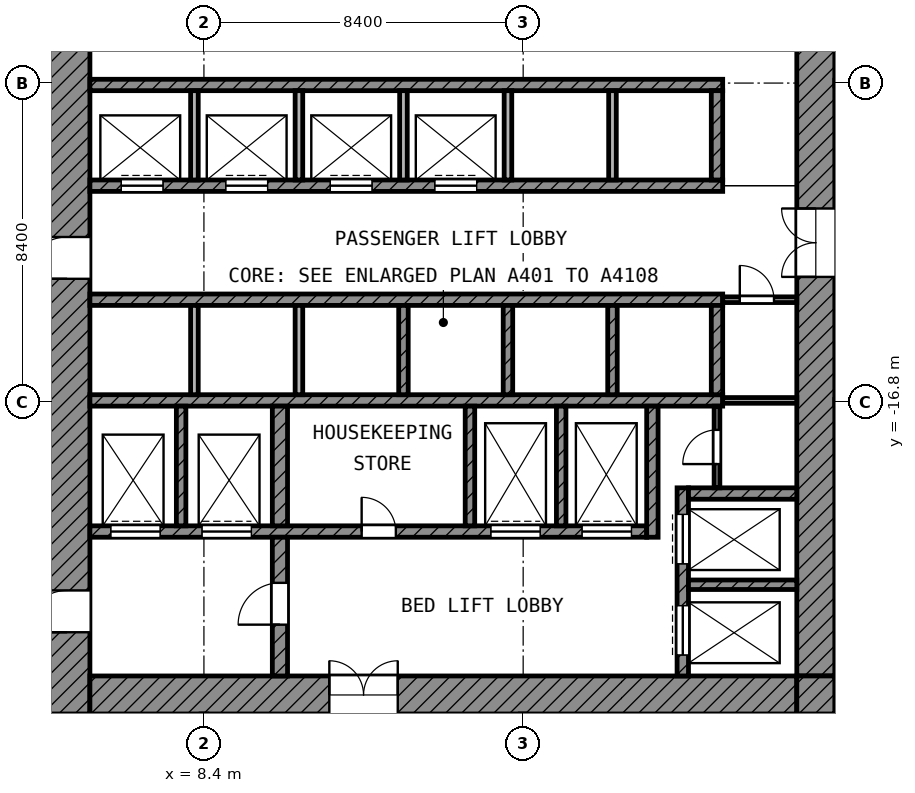
"""IFC4 building model, lengths in metres.
Left out: names, types, materials, properties, quantities, classifications, styles, units other than length and angle.
Written with IfcOpenShell. Run it as: python <this file> out.ifc"""

import sys

from ifc_helpers import new_model, si_unit, direction, frame, frame_2d, origin, place, context, subcontext, project, spatial, rectangle, extrude, element, fill, save


model = new_model("IFC4")
c1 = context("Model", 3, precision=1e-05, world=origin(), true_north=direction((0.0, 1.0)))
c2 = subcontext(c1, "Body", "Model", "MODEL_VIEW")
j1 = project(units=[si_unit("LENGTHUNIT", "METRE"), si_unit("PLANEANGLEUNIT", "RADIAN")], contexts=[c1])
p1 = place(None, origin())
s1 = spatial("IfcSite", under=j1, at=p1, CompositionType="ELEMENT")
p2 = place(p1, origin())
s2 = spatial("IfcBuilding", under=s1, at=p2, CompositionType="ELEMENT")
p3 = place(p2, frame((0.0, 0.0, 140.8)))
s3 = spatial("IfcBuildingStorey", under=s2, at=p3, CompositionType="ELEMENT", Elevation=140.8)
p4 = place(p3, frame((4.8, -25.0, 0.0), z_axis=(0.0, 0.0, 1.0), x_axis=(0.0, 1.0, 0.0)))
e1 = element("IfcWall", 1, at=p4, inside=s3, PredefinedType="SHEAR", context=c2, shape_type="SweptSolid", body=[
    extrude(rectangle(XDim=19.6, YDim=1.2, at=frame_2d((9.8, 0.0))), origin(), (0.0, 0.0, 1.0), 3.6),
])
p5 = place(p4, frame((11.45, 0.0, 0.0)))
e2 = element("IfcOpeningElement", 2, at=p5, cuts=e1, PredefinedType="OPENING", context=c2, shape_type="SweptSolid", body=[
    extrude(rectangle(XDim=1.1, YDim=2.1, at=frame_2d((0.55, 1.05))), frame((0.0, 0.61, 0.0), z_axis=(0.0, -1.0, 0.0), x_axis=(1.0, 0.0, 0.0)), (0.0, 0.0, 1.0), 1.22),
])
p6 = place(p4, frame((2.15, 0.0, 0.0)))
e3 = element("IfcOpeningElement", 3, at=p6, cuts=e1, PredefinedType="OPENING", context=c2, shape_type="SweptSolid", body=[
    extrude(rectangle(XDim=1.1, YDim=2.1, at=frame_2d((0.55, 1.05))), frame((0.0, 0.61, 0.0), z_axis=(0.0, -1.0, 0.0), x_axis=(1.0, 0.0, 0.0)), (0.0, 0.0, 1.0), 1.22),
])
p7 = place(p3, frame((24.5, -24.0, 0.0), z_axis=(0.0, 0.0, 1.0), x_axis=(0.0, 1.0, 0.0)))
e4 = element("IfcWall", 4, at=p7, inside=s3, PredefinedType="SHEAR", context=c2, shape_type="SweptSolid", body=[
    extrude(rectangle(XDim=18.6, YDim=1.0, at=frame_2d((9.3, 0.0))), origin(), (0.0, 0.0, 1.0), 3.6),
])
p8 = place(p7, frame((10.5, 0.0, 0.0)))
e5 = element("IfcOpeningElement", 5, at=p8, cuts=e4, PredefinedType="OPENING", context=c2, shape_type="SweptSolid", body=[
    extrude(rectangle(XDim=1.8, YDim=2.1, at=frame_2d((0.9, 1.05))), frame((0.0, 0.51, 0.0), z_axis=(0.0, -1.0, 0.0), x_axis=(1.0, 0.0, 0.0)), (0.0, 0.0, 1.0), 1.02),
])
p9 = place(p3, frame((5.4, -24.5, 0.0), z_axis=(0.0, 0.0, 1.0), x_axis=(1.0, 0.0, 0.0)))
e6 = element("IfcWall", 6, at=p9, inside=s3, PredefinedType="SHEAR", context=c2, shape_type="SweptSolid", body=[
    extrude(rectangle(XDim=18.6, YDim=1.0, at=frame_2d((9.3, 0.0))), origin(), (0.0, 0.0, 1.0), 3.6),
])
p10 = place(p9, frame((6.3, 0.0, 0.0)))
e7 = element("IfcOpeningElement", 7, at=p10, cuts=e6, PredefinedType="OPENING", context=c2, shape_type="SweptSolid", body=[
    extrude(rectangle(XDim=1.8, YDim=2.1, at=frame_2d((0.9, 1.05))), frame((0.0, 0.51, 0.0), z_axis=(0.0, -1.0, 0.0), x_axis=(1.0, 0.0, 0.0)), (0.0, 0.0, 1.0), 1.02),
])
p11 = place(p3, frame((24.5, -25.0, 0.0), z_axis=(0.0, 0.0, 1.0), x_axis=(0.0, 1.0, 0.0)))
e8 = element("IfcWall", 8, at=p11, inside=s3, PredefinedType="SHEAR", context=c2, shape_type="SweptSolid", body=[
    extrude(rectangle(XDim=1.0, YDim=1.0, at=frame_2d((0.5, 0.0))), origin(), (0.0, 0.0, 1.0), 3.6),
])
p12 = place(p3, frame((5.4, -8.45, 0.0), z_axis=(0.0, 0.0, 1.0), x_axis=(1.0, 0.0, 0.0)))
e9 = element("IfcWall", 9, at=p12, inside=s3, PredefinedType="SHEAR", context=c2, shape_type="SweptSolid", body=[
    extrude(rectangle(XDim=16.65, YDim=0.3, at=frame_2d((8.325, 0.0))), origin(), (0.0, 0.0, 1.0), 3.6),
])
p13 = place(p3, frame((5.4, -11.1, 0.0), z_axis=(0.0, 0.0, 1.0), x_axis=(1.0, 0.0, 0.0)))
e10 = element("IfcWall", 10, at=p13, inside=s3, PredefinedType="SHEAR", context=c2, shape_type="SweptSolid", body=[
    extrude(rectangle(XDim=16.65, YDim=0.3, at=frame_2d((8.325, 0.0))), origin(), (0.0, 0.0, 1.0), 3.6),
])
p14 = place(p13, frame((0.825, 0.0, 0.0)))
e11 = element("IfcOpeningElement", 11, at=p14, cuts=e10, PredefinedType="OPENING", context=c2, shape_type="SweptSolid", body=[
    extrude(rectangle(XDim=1.1, YDim=2.1, at=frame_2d((0.55, 1.05))), frame((0.0, 0.16, 0.0), z_axis=(0.0, -1.0, 0.0), x_axis=(1.0, 0.0, 0.0)), (0.0, 0.0, 1.0), 0.32),
])
p15 = place(p13, frame((3.575, 0.0, 0.0)))
e12 = element("IfcOpeningElement", 12, at=p15, cuts=e10, PredefinedType="OPENING", context=c2, shape_type="SweptSolid", body=[
    extrude(rectangle(XDim=1.1, YDim=2.1, at=frame_2d((0.55, 1.05))), frame((0.0, 0.16, 0.0), z_axis=(0.0, -1.0, 0.0), x_axis=(1.0, 0.0, 0.0)), (0.0, 0.0, 1.0), 0.32),
])
p16 = place(p13, frame((6.325, 0.0, 0.0)))
e13 = element("IfcOpeningElement", 13, at=p16, cuts=e10, PredefinedType="OPENING", context=c2, shape_type="SweptSolid", body=[
    extrude(rectangle(XDim=1.1, YDim=2.1, at=frame_2d((0.55, 1.05))), frame((0.0, 0.16, 0.0), z_axis=(0.0, -1.0, 0.0), x_axis=(1.0, 0.0, 0.0)), (0.0, 0.0, 1.0), 0.32),
])
p17 = place(p13, frame((9.075, 0.0, 0.0)))
e14 = element("IfcOpeningElement", 14, at=p17, cuts=e10, PredefinedType="OPENING", context=c2, shape_type="SweptSolid", body=[
    extrude(rectangle(XDim=1.1, YDim=2.1, at=frame_2d((0.55, 1.05))), frame((0.0, 0.16, 0.0), z_axis=(0.0, -1.0, 0.0), x_axis=(1.0, 0.0, 0.0)), (0.0, 0.0, 1.0), 0.32),
])
for number, where, z_axis, x_axis in (
    (15, (5.4, -14.1, 0.0), (0.0, 0.0, 1.0), (1.0, 0.0, 0.0)),
    (16, (5.4, -16.75, 0.0), (0.0, 0.0, 1.0), (1.0, 0.0, 0.0)),
):
    element("IfcWall", number, at=place(p3, frame(where, z_axis=z_axis, x_axis=x_axis)), inside=s3, PredefinedType="SHEAR", context=c2, shape_type="SweptSolid", body=[
        extrude(rectangle(XDim=16.65, YDim=0.3, at=frame_2d((8.325, 0.0))), origin(), (0.0, 0.0, 1.0), 3.6),
    ])
p18 = place(p3, frame((5.4, -20.2, 0.0), z_axis=(0.0, 0.0, 1.0), x_axis=(1.0, 0.0, 0.0)))
e17 = element("IfcWall", 17, at=p18, inside=s3, PredefinedType="SHEAR", context=c2, shape_type="SweptSolid", body=[
    extrude(rectangle(XDim=14.65, YDim=0.3, at=frame_2d((7.325, 0.0))), origin(), (0.0, 0.0, 1.0), 3.6),
])
p19 = place(p18, frame((10.55, 0.0, 0.0)))
e18 = element("IfcOpeningElement", 18, at=p19, cuts=e17, PredefinedType="OPENING", context=c2, shape_type="SweptSolid", body=[
    extrude(rectangle(XDim=1.3, YDim=2.1, at=frame_2d((0.65, 1.05))), frame((0.0, 0.16, 0.0), z_axis=(0.0, -1.0, 0.0), x_axis=(1.0, 0.0, 0.0)), (0.0, 0.0, 1.0), 0.32),
])
p20 = place(p18, frame((12.95, 0.0, 0.0)))
e19 = element("IfcOpeningElement", 19, at=p20, cuts=e17, PredefinedType="OPENING", context=c2, shape_type="SweptSolid", body=[
    extrude(rectangle(XDim=1.3, YDim=2.1, at=frame_2d((0.65, 1.05))), frame((0.0, 0.16, 0.0), z_axis=(0.0, -1.0, 0.0), x_axis=(1.0, 0.0, 0.0)), (0.0, 0.0, 1.0), 0.32),
])
p21 = place(p18, frame((0.55, 0.0, 0.0)))
e20 = element("IfcOpeningElement", 20, at=p21, cuts=e17, PredefinedType="OPENING", context=c2, shape_type="SweptSolid", body=[
    extrude(rectangle(XDim=1.3, YDim=2.1, at=frame_2d((0.65, 1.05))), frame((0.0, 0.16, 0.0), z_axis=(0.0, -1.0, 0.0), x_axis=(1.0, 0.0, 0.0)), (0.0, 0.0, 1.0), 0.32),
])
p22 = place(p18, frame((2.95, 0.0, 0.0)))
e21 = element("IfcOpeningElement", 21, at=p22, cuts=e17, PredefinedType="OPENING", context=c2, shape_type="SweptSolid", body=[
    extrude(rectangle(XDim=1.3, YDim=2.1, at=frame_2d((0.65, 1.05))), frame((0.0, 0.16, 0.0), z_axis=(0.0, -1.0, 0.0), x_axis=(1.0, 0.0, 0.0)), (0.0, 0.0, 1.0), 0.32),
])
p23 = place(p18, frame((7.15, 0.0, 0.0)))
e22 = element("IfcOpeningElement", 22, at=p23, cuts=e17, PredefinedType="OPENING", context=c2, shape_type="SweptSolid", body=[
    extrude(rectangle(XDim=0.9, YDim=2.1, at=frame_2d((0.45, 1.05))), frame((0.0, 0.16, 0.0), z_axis=(0.0, -1.0, 0.0), x_axis=(1.0, 0.0, 0.0)), (0.0, 0.0, 1.0), 0.32),
])
p24 = place(p3, frame((10.4, -24.0, 0.0), z_axis=(0.0, 0.0, 1.0), x_axis=(0.0, 1.0, 0.0)))
e23 = element("IfcWall", 23, at=p24, inside=s3, PredefinedType="SHEAR", context=c2, shape_type="SweptSolid", body=[
    extrude(rectangle(XDim=3.65, YDim=0.4, at=frame_2d((1.825, 0.0))), origin(), (0.0, 0.0, 1.0), 3.6),
])
p25 = place(p24, frame((1.35, 0.0, 0.0)))
e24 = element("IfcOpeningElement", 24, at=p25, cuts=e23, PredefinedType="OPENING", context=c2, shape_type="SweptSolid", body=[
    extrude(rectangle(XDim=1.1, YDim=2.1, at=frame_2d((0.55, 1.05))), frame((0.0, 0.21, 0.0), z_axis=(0.0, -1.0, 0.0), x_axis=(1.0, 0.0, 0.0)), (0.0, 0.0, 1.0), 0.42),
])
p26 = place(p3, frame((10.4, -20.05, 0.0), z_axis=(0.0, 0.0, 1.0), x_axis=(0.0, 1.0, 0.0)))
e25 = element("IfcWall", 25, at=p26, inside=s3, PredefinedType="SHEAR", context=c2, shape_type="SweptSolid", body=[
    extrude(rectangle(XDim=3.15, YDim=0.4, at=frame_2d((1.575, 0.0))), origin(), (0.0, 0.0, 1.0), 3.6),
])
p27 = place(p3, frame((20.2, -20.35, 0.0), z_axis=(0.0, 0.0, 1.0), x_axis=(0.0, 1.0, 0.0)))
e26 = element("IfcWall", 26, at=p27, inside=s3, PredefinedType="SHEAR", context=c2, shape_type="SweptSolid", body=[
    extrude(rectangle(XDim=3.45, YDim=0.3, at=frame_2d((1.725, 0.0))), origin(), (0.0, 0.0, 1.0), 3.6),
])
p28 = place(p3, frame((21.9, -10.95, 0.0), z_axis=(0.0, 0.0, 1.0), x_axis=(0.0, 1.0, 0.0)))
e27 = element("IfcWall", 27, at=p28, inside=s3, PredefinedType="SHEAR", context=c2, shape_type="SweptSolid", body=[
    extrude(rectangle(XDim=2.35, YDim=0.3, at=frame_2d((1.175, 0.0))), origin(), (0.0, 0.0, 1.0), 3.6),
])
p29 = place(p3, frame((21.9, -16.6, 0.0), z_axis=(0.0, 0.0, 1.0), x_axis=(0.0, 1.0, 0.0)))
e28 = element("IfcWall", 28, at=p29, inside=s3, PredefinedType="SHEAR", context=c2, shape_type="SweptSolid", body=[
    extrude(rectangle(XDim=2.35, YDim=0.3, at=frame_2d((1.175, 0.0))), origin(), (0.0, 0.0, 1.0), 3.6),
])
p30 = place(p3, frame((21.15, -19.2, 0.0), z_axis=(0.0, 0.0, 1.0), x_axis=(1.0, 0.0, 0.0)))
e29 = element("IfcWall", 29, at=p30, inside=s3, PredefinedType="SHEAR", context=c2, shape_type="SweptSolid", body=[
    extrude(rectangle(XDim=2.85, YDim=0.3, at=frame_2d((1.425, 0.0))), origin(), (0.0, 0.0, 1.0), 3.6),
])
p31 = place(p3, frame((21.0, -24.0, 0.0), z_axis=(0.0, 0.0, 1.0), x_axis=(0.0, 1.0, 0.0)))
e30 = element("IfcWall", 30, at=p31, inside=s3, PredefinedType="SHEAR", context=c2, shape_type="SweptSolid", body=[
    extrude(rectangle(XDim=4.95, YDim=0.3, at=frame_2d((2.475, 0.0))), origin(), (0.0, 0.0, 1.0), 3.6),
])
p32 = place(p31, frame((2.95, 0.0, 0.0)))
e31 = element("IfcOpeningElement", 31, at=p32, cuts=e30, PredefinedType="OPENING", context=c2, shape_type="SweptSolid", body=[
    extrude(rectangle(XDim=1.3, YDim=2.1, at=frame_2d((0.65, 1.05))), frame((0.0, 0.16, 0.0), z_axis=(0.0, -1.0, 0.0), x_axis=(1.0, 0.0, 0.0)), (0.0, 0.0, 1.0), 0.32),
])
p33 = place(p31, frame((0.55, 0.0, 0.0)))
e32 = element("IfcOpeningElement", 32, at=p33, cuts=e30, PredefinedType="OPENING", context=c2, shape_type="SweptSolid", body=[
    extrude(rectangle(XDim=1.3, YDim=2.1, at=frame_2d((0.65, 1.05))), frame((0.0, 0.16, 0.0), z_axis=(0.0, -1.0, 0.0), x_axis=(1.0, 0.0, 0.0)), (0.0, 0.0, 1.0), 0.32),
])
p34 = place(p3, frame((21.15, -21.6, 0.0), z_axis=(0.0, 0.0, 1.0), x_axis=(1.0, 0.0, 0.0)))
e33 = element("IfcWall", 33, at=p34, inside=s3, PredefinedType="SHEAR", context=c2, shape_type="SweptSolid", body=[
    extrude(rectangle(XDim=2.85, YDim=0.25, at=frame_2d((1.425, 0.0))), origin(), (0.0, 0.0, 1.0), 3.6),
])
for number, where, z_axis, x_axis in (
    (34, (7.8, -20.05, 0.0), (0.0, 0.0, 1.0), (0.0, 1.0, 0.0)),
    (35, (15.4, -20.05, 0.0), (0.0, 0.0, 1.0), (0.0, 1.0, 0.0)),
    (36, (17.8, -20.05, 0.0), (0.0, 0.0, 1.0), (0.0, 1.0, 0.0)),
):
    element("IfcWall", number, at=place(p3, frame(where, z_axis=z_axis, x_axis=x_axis)), inside=s3, PredefinedType="SHEAR", context=c2, shape_type="SweptSolid", body=[
        extrude(rectangle(XDim=3.15, YDim=0.25, at=frame_2d((1.575, 0.0))), origin(), (0.0, 0.0, 1.0), 3.6),
    ])
for number, where, z_axis, x_axis in (
    (37, (8.15, -10.95, 0.0), (0.0, 0.0, 1.0), (0.0, 1.0, 0.0)),
    (38, (10.9, -10.95, 0.0), (0.0, 0.0, 1.0), (0.0, 1.0, 0.0)),
    (39, (13.65, -10.95, 0.0), (0.0, 0.0, 1.0), (0.0, 1.0, 0.0)),
    (40, (16.4, -10.95, 0.0), (0.0, 0.0, 1.0), (0.0, 1.0, 0.0)),
    (41, (19.15, -10.95, 0.0), (0.0, 0.0, 1.0), (0.0, 1.0, 0.0)),
):
    element("IfcWall", number, at=place(p3, frame(where, z_axis=z_axis, x_axis=x_axis)), inside=s3, PredefinedType="PARTITIONING", context=c2, shape_type="SweptSolid", body=[
        extrude(rectangle(XDim=2.35, YDim=0.2, at=frame_2d((1.175, 0.0))), origin(), (0.0, 0.0, 1.0), 3.6),
    ])
for number, where, z_axis, x_axis in (
    (42, (8.15, -16.6, 0.0), (0.0, 0.0, 1.0), (0.0, 1.0, 0.0)),
    (43, (10.9, -16.6, 0.0), (0.0, 0.0, 1.0), (0.0, 1.0, 0.0)),
):
    element("IfcWall", number, at=place(p3, frame(where, z_axis=z_axis, x_axis=x_axis)), inside=s3, PredefinedType="PARTITIONING", context=c2, shape_type="SweptSolid", body=[
        extrude(rectangle(XDim=2.35, YDim=0.2, at=frame_2d((1.175, 0.0))), origin(), (0.0, 0.0, 1.0), 3.6),
    ])
for number, where, z_axis, x_axis in (
    (44, (13.65, -16.6, 0.0), (0.0, 0.0, 1.0), (0.0, 1.0, 0.0)),
    (45, (16.4, -16.6, 0.0), (0.0, 0.0, 1.0), (0.0, 1.0, 0.0)),
    (46, (19.15, -16.6, 0.0), (0.0, 0.0, 1.0), (0.0, 1.0, 0.0)),
):
    element("IfcWall", number, at=place(p3, frame(where, z_axis=z_axis, x_axis=x_axis)), inside=s3, PredefinedType="SHEAR", context=c2, shape_type="SweptSolid", body=[
        extrude(rectangle(XDim=2.35, YDim=0.25, at=frame_2d((1.175, 0.0))), origin(), (0.0, 0.0, 1.0), 3.6),
    ])
p35 = place(p3, frame((21.9, -19.05, 0.0), z_axis=(0.0, 0.0, 1.0), x_axis=(0.0, 1.0, 0.0)))
e47 = element("IfcWall", 47, at=p35, inside=s3, PredefinedType="PARTITIONING", context=c2, shape_type="SweptSolid", body=[
    extrude(rectangle(XDim=2.15, YDim=0.15, at=frame_2d((1.075, 0.0))), origin(), (0.0, 0.0, 1.0), 3.6),
])
p36 = place(p35, frame((0.625, 0.0, 0.0)))
e48 = element("IfcOpeningElement", 48, at=p36, cuts=e47, PredefinedType="OPENING", context=c2, shape_type="SweptSolid", body=[
    extrude(rectangle(XDim=0.9, YDim=2.1, at=frame_2d((0.45, 1.05))), frame((0.0, 0.085, 0.0), z_axis=(0.0, -1.0, 0.0), x_axis=(1.0, 0.0, 0.0)), (0.0, 0.0, 1.0), 0.17),
])
p37 = place(p3, frame((22.05, -16.75, 0.0), z_axis=(0.0, 0.0, 1.0), x_axis=(1.0, 0.0, 0.0)))
e49 = element("IfcWall", 49, at=p37, inside=s3, PredefinedType="PARTITIONING", context=c2, shape_type="SweptSolid", body=[
    extrude(rectangle(XDim=1.95, YDim=0.15, at=frame_2d((0.975, 0.0))), origin(), (0.0, 0.0, 1.0), 3.6),
])
p38 = place(p3, frame((22.05, -14.1, 0.0), z_axis=(0.0, 0.0, 1.0), x_axis=(1.0, 0.0, 0.0)))
e50 = element("IfcWall", 50, at=p38, inside=s3, PredefinedType="PARTITIONING", context=c2, shape_type="SweptSolid", body=[
    extrude(rectangle(XDim=1.95, YDim=0.15, at=frame_2d((0.975, 0.0))), origin(), (0.0, 0.0, 1.0), 3.6),
])
p39 = place(p38, frame((0.45, 0.0, 0.0)))
e51 = element("IfcOpeningElement", 51, at=p39, cuts=e50, PredefinedType="OPENING", context=c2, shape_type="SweptSolid", body=[
    extrude(rectangle(XDim=0.9, YDim=2.1, at=frame_2d((0.45, 1.05))), frame((0.0, 0.085, 0.0), z_axis=(0.0, -1.0, 0.0), x_axis=(1.0, 0.0, 0.0)), (0.0, 0.0, 1.0), 0.17),
])
p40 = place(p14, origin())
e52 = element("IfcDoor", 52, at=p40, inside=s3, OperationType="DOUBLE_DOOR_SLIDING", PredefinedType="DOOR", context=c2, shape_type="SweptSolid", body=[
    extrude(rectangle(XDim=1.1, YDim=2.1, at=frame_2d((0.55, 1.05))), frame((0.0, 0.025, 0.0), z_axis=(0.0, -1.0, 0.0), x_axis=(1.0, 0.0, 0.0)), (0.0, 0.0, 1.0), 0.05),
])
fill(e11, e52)
p41 = place(p15, origin())
e53 = element("IfcDoor", 53, at=p41, inside=s3, OperationType="DOUBLE_DOOR_SLIDING", PredefinedType="DOOR", context=c2, shape_type="SweptSolid", body=[
    extrude(rectangle(XDim=1.1, YDim=2.1, at=frame_2d((0.55, 1.05))), frame((0.0, 0.025, 0.0), z_axis=(0.0, -1.0, 0.0), x_axis=(1.0, 0.0, 0.0)), (0.0, 0.0, 1.0), 0.05),
])
fill(e12, e53)
p42 = place(p16, origin())
e54 = element("IfcDoor", 54, at=p42, inside=s3, OperationType="DOUBLE_DOOR_SLIDING", PredefinedType="DOOR", context=c2, shape_type="SweptSolid", body=[
    extrude(rectangle(XDim=1.1, YDim=2.1, at=frame_2d((0.55, 1.05))), frame((0.0, 0.025, 0.0), z_axis=(0.0, -1.0, 0.0), x_axis=(1.0, 0.0, 0.0)), (0.0, 0.0, 1.0), 0.05),
])
fill(e13, e54)
p43 = place(p17, origin())
e55 = element("IfcDoor", 55, at=p43, inside=s3, OperationType="DOUBLE_DOOR_SLIDING", PredefinedType="DOOR", context=c2, shape_type="SweptSolid", body=[
    extrude(rectangle(XDim=1.1, YDim=2.1, at=frame_2d((0.55, 1.05))), frame((0.0, 0.025, 0.0), z_axis=(0.0, -1.0, 0.0), x_axis=(1.0, 0.0, 0.0)), (0.0, 0.0, 1.0), 0.05),
])
fill(e14, e55)
p44 = place(p32, origin())
e56 = element("IfcDoor", 56, at=p44, inside=s3, OperationType="DOUBLE_DOOR_SLIDING", PredefinedType="DOOR", context=c2, shape_type="SweptSolid", body=[
    extrude(rectangle(XDim=1.3, YDim=2.1, at=frame_2d((0.65, 1.05))), frame((0.0, 0.025, 0.0), z_axis=(0.0, -1.0, 0.0), x_axis=(1.0, 0.0, 0.0)), (0.0, 0.0, 1.0), 0.05),
])
fill(e31, e56)
p45 = place(p33, origin())
e57 = element("IfcDoor", 57, at=p45, inside=s3, OperationType="DOUBLE_DOOR_SLIDING", PredefinedType="DOOR", context=c2, shape_type="SweptSolid", body=[
    extrude(rectangle(XDim=1.3, YDim=2.1, at=frame_2d((0.65, 1.05))), frame((0.0, 0.025, 0.0), z_axis=(0.0, -1.0, 0.0), x_axis=(1.0, 0.0, 0.0)), (0.0, 0.0, 1.0), 0.05),
])
fill(e32, e57)
p46 = place(p19, origin())
e58 = element("IfcDoor", 58, at=p46, inside=s3, OperationType="DOUBLE_DOOR_SLIDING", PredefinedType="DOOR", context=c2, shape_type="SweptSolid", body=[
    extrude(rectangle(XDim=1.3, YDim=2.1, at=frame_2d((0.65, 1.05))), frame((0.0, 0.025, 0.0), z_axis=(0.0, -1.0, 0.0), x_axis=(1.0, 0.0, 0.0)), (0.0, 0.0, 1.0), 0.05),
])
fill(e18, e58)
p47 = place(p20, origin())
e59 = element("IfcDoor", 59, at=p47, inside=s3, OperationType="DOUBLE_DOOR_SLIDING", PredefinedType="DOOR", context=c2, shape_type="SweptSolid", body=[
    extrude(rectangle(XDim=1.3, YDim=2.1, at=frame_2d((0.65, 1.05))), frame((0.0, 0.025, 0.0), z_axis=(0.0, -1.0, 0.0), x_axis=(1.0, 0.0, 0.0)), (0.0, 0.0, 1.0), 0.05),
])
fill(e19, e59)
p48 = place(p21, origin())
e60 = element("IfcDoor", 60, at=p48, inside=s3, OperationType="DOUBLE_DOOR_SLIDING", PredefinedType="DOOR", context=c2, shape_type="SweptSolid", body=[
    extrude(rectangle(XDim=1.3, YDim=2.1, at=frame_2d((0.65, 1.05))), frame((0.0, 0.025, 0.0), z_axis=(0.0, -1.0, 0.0), x_axis=(1.0, 0.0, 0.0)), (0.0, 0.0, 1.0), 0.05),
])
fill(e20, e60)
p49 = place(p22, origin())
e61 = element("IfcDoor", 61, at=p49, inside=s3, OperationType="DOUBLE_DOOR_SLIDING", PredefinedType="DOOR", context=c2, shape_type="SweptSolid", body=[
    extrude(rectangle(XDim=1.3, YDim=2.1, at=frame_2d((0.65, 1.05))), frame((0.0, 0.025, 0.0), z_axis=(0.0, -1.0, 0.0), x_axis=(1.0, 0.0, 0.0)), (0.0, 0.0, 1.0), 0.05),
])
fill(e21, e61)
p50 = place(p5, origin())
e62 = element("IfcDoor", 62, at=p50, inside=s3, OperationType="SINGLE_SWING_LEFT", PredefinedType="DOOR", context=c2, shape_type="SweptSolid", body=[
    extrude(rectangle(XDim=1.1, YDim=2.1, at=frame_2d((0.55, 1.05))), frame((0.0, 0.025, 0.0), z_axis=(0.0, -1.0, 0.0), x_axis=(1.0, 0.0, 0.0)), (0.0, 0.0, 1.0), 0.05),
])
fill(e2, e62)
p51 = place(p6, origin())
e63 = element("IfcDoor", 63, at=p51, inside=s3, OperationType="SINGLE_SWING_LEFT", PredefinedType="DOOR", context=c2, shape_type="SweptSolid", body=[
    extrude(rectangle(XDim=1.1, YDim=2.1, at=frame_2d((0.55, 1.05))), frame((0.0, 0.025, 0.0), z_axis=(0.0, -1.0, 0.0), x_axis=(1.0, 0.0, 0.0)), (0.0, 0.0, 1.0), 0.05),
])
fill(e3, e63)
p52 = place(p25, origin())
e64 = element("IfcDoor", 64, at=p52, inside=s3, OperationType="SINGLE_SWING_LEFT", PredefinedType="DOOR", context=c2, shape_type="SweptSolid", body=[
    extrude(rectangle(XDim=1.1, YDim=2.1, at=frame_2d((0.55, 1.05))), frame((0.0, 0.025, 0.0), z_axis=(0.0, -1.0, 0.0), x_axis=(1.0, 0.0, 0.0)), (0.0, 0.0, 1.0), 0.05),
])
fill(e24, e64)
p53 = place(p8, origin())
e65 = element("IfcDoor", 65, at=p53, inside=s3, OperationType="DOUBLE_DOOR_SINGLE_SWING", PredefinedType="DOOR", context=c2, shape_type="SweptSolid", body=[
    extrude(rectangle(XDim=1.8, YDim=2.1, at=frame_2d((0.9, 1.05))), frame((0.0, 0.025, 0.0), z_axis=(0.0, -1.0, 0.0), x_axis=(1.0, 0.0, 0.0)), (0.0, 0.0, 1.0), 0.05),
])
fill(e5, e65)
p54 = place(p10, origin())
e66 = element("IfcDoor", 66, at=p54, inside=s3, OperationType="DOUBLE_DOOR_SINGLE_SWING", PredefinedType="DOOR", context=c2, shape_type="SweptSolid", body=[
    extrude(rectangle(XDim=1.8, YDim=2.1, at=frame_2d((0.9, 1.05))), frame((0.0, 0.025, 0.0), z_axis=(0.0, -1.0, 0.0), x_axis=(1.0, 0.0, 0.0)), (0.0, 0.0, 1.0), 0.05),
])
fill(e7, e66)
p55 = place(p39, origin())
e67 = element("IfcDoor", 67, at=p55, inside=s3, OperationType="SINGLE_SWING_LEFT", PredefinedType="DOOR", context=c2, shape_type="SweptSolid", body=[
    extrude(rectangle(XDim=0.9, YDim=2.1, at=frame_2d((0.45, 1.05))), frame((0.0, 0.025, 0.0), z_axis=(0.0, -1.0, 0.0), x_axis=(1.0, 0.0, 0.0)), (0.0, 0.0, 1.0), 0.05),
])
fill(e51, e67)
p56 = place(p36, origin())
e68 = element("IfcDoor", 68, at=p56, inside=s3, OperationType="SINGLE_SWING_LEFT", PredefinedType="DOOR", context=c2, shape_type="SweptSolid", body=[
    extrude(rectangle(XDim=0.9, YDim=2.1, at=frame_2d((0.45, 1.05))), frame((0.0, 0.025, 0.0), z_axis=(0.0, -1.0, 0.0), x_axis=(1.0, 0.0, 0.0)), (0.0, 0.0, 1.0), 0.05),
])
fill(e48, e68)
p57 = place(p23, origin())
e69 = element("IfcDoor", 69, at=p57, inside=s3, OperationType="SINGLE_SWING_LEFT", PredefinedType="DOOR", context=c2, shape_type="SweptSolid", body=[
    extrude(rectangle(XDim=0.9, YDim=2.1, at=frame_2d((0.45, 1.05))), frame((0.0, 0.025, 0.0), z_axis=(0.0, -1.0, 0.0), x_axis=(1.0, 0.0, 0.0)), (0.0, 0.0, 1.0), 0.05),
])
fill(e22, e69)
save(model, sys.argv[1])
